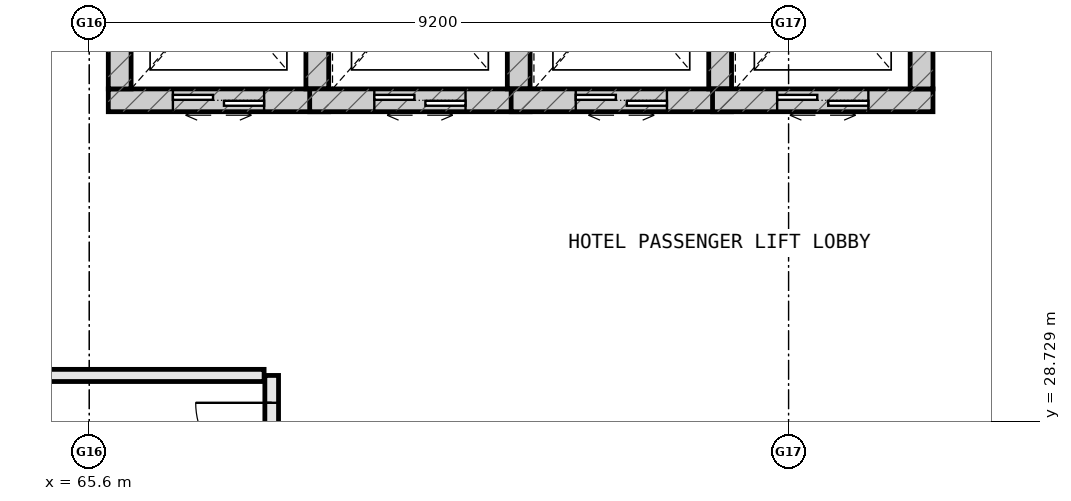
"""IFC4 building model, lengths in metres.
Left out: names, types, materials, properties, quantities, classifications, styles, units other than length and angle.
Written with IfcOpenShell. Run it as: python <this file> out.ifc"""

import sys

from ifc_helpers import new_model, si_unit, direction, frame, frame_2d, origin, place, context, subcontext, project, spatial, rectangle, extrude, element, fill, save


model = new_model("IFC4")
c1 = context("Model", 3, precision=1e-05, world=origin(), true_north=direction((0.0, 1.0)))
c2 = subcontext(c1, "Body", "Model", "MODEL_VIEW")
j1 = project(units=[si_unit("LENGTHUNIT", "METRE"), si_unit("PLANEANGLEUNIT", "RADIAN")], contexts=[c1])
p1 = place(None, origin())
s1 = spatial("IfcSite", under=j1, at=p1, CompositionType="ELEMENT")
p2 = place(p1, origin())
s2 = spatial("IfcBuilding", under=s1, at=p2, CompositionType="ELEMENT")
p3 = place(p2, frame((0.0, 0.0, 16.2)))
s3 = spatial("IfcBuildingStorey", under=s2, at=p3, CompositionType="ELEMENT", Elevation=16.2)
p4 = place(p3, frame((65.85, 32.95, 0.0), z_axis=(0.0, 0.0, 1.0), x_axis=(1.0, 0.0, 0.0)))
e1 = element("IfcWall", 1, at=p4, inside=s3, PredefinedType="SHEAR", context=c2, shape_type="SweptSolid", body=[
    extrude(rectangle(XDim=2.9, YDim=0.3, at=frame_2d((1.45, 0.0))), origin(), (0.0, 0.0, 1.0), 3.8),
])
p5 = place(p4, frame((0.85, 0.0, 0.0)))
e2 = element("IfcOpeningElement", 2, at=p5, cuts=e1, PredefinedType="OPENING", context=c2, shape_type="SweptSolid", body=[
    extrude(rectangle(XDim=1.2, YDim=2.2, at=frame_2d((0.6, 1.1))), frame((0.0, 0.162, 0.0), z_axis=(0.0, -1.0, 0.0), x_axis=(1.0, 0.0, 0.0)), (0.0, 0.0, 1.0), 0.324),
])
for number, where, z_axis, x_axis in (
    (3, (68.6, 33.1, 0.0), (0.0, 0.0, 1.0), (0.0, 1.0, 0.0)),
    (4, (66.0, 35.7, 0.0), (0.0, 0.0, 1.0), (0.0, -1.0, 0.0)),
):
    element("IfcWall", number, at=place(p3, frame(where, z_axis=z_axis, x_axis=x_axis)), inside=s3, PredefinedType="SHEAR", context=c2, shape_type="SweptSolid", body=[
        extrude(rectangle(XDim=2.6, YDim=0.3, at=frame_2d((1.3, 0.0))), origin(), (0.0, 0.0, 1.0), 3.8),
    ])
p6 = place(p3, frame((68.5, 32.95, 0.0), z_axis=(0.0, 0.0, 1.0), x_axis=(1.0, 0.0, 0.0)))
e5 = element("IfcWall", 5, at=p6, inside=s3, PredefinedType="SHEAR", context=c2, shape_type="SweptSolid", body=[
    extrude(rectangle(XDim=2.9, YDim=0.3, at=frame_2d((1.45, 0.0))), origin(), (0.0, 0.0, 1.0), 3.8),
])
p7 = place(p6, frame((0.85, 0.0, 0.0)))
e6 = element("IfcOpeningElement", 6, at=p7, cuts=e5, PredefinedType="OPENING", context=c2, shape_type="SweptSolid", body=[
    extrude(rectangle(XDim=1.2, YDim=2.2, at=frame_2d((0.6, 1.1))), frame((0.0, 0.162, 0.0), z_axis=(0.0, -1.0, 0.0), x_axis=(1.0, 0.0, 0.0)), (0.0, 0.0, 1.0), 0.324),
])
p8 = place(p3, frame((71.25, 33.1, 0.0), z_axis=(0.0, 0.0, 1.0), x_axis=(0.0, 1.0, 0.0)))
e7 = element("IfcWall", 7, at=p8, inside=s3, PredefinedType="SHEAR", context=c2, shape_type="SweptSolid", body=[
    extrude(rectangle(XDim=2.6, YDim=0.3, at=frame_2d((1.3, 0.0))), origin(), (0.0, 0.0, 1.0), 3.8),
])
p9 = place(p3, frame((71.15, 32.95, 0.0), z_axis=(0.0, 0.0, 1.0), x_axis=(1.0, 0.0, 0.0)))
e8 = element("IfcWall", 8, at=p9, inside=s3, PredefinedType="SHEAR", context=c2, shape_type="SweptSolid", body=[
    extrude(rectangle(XDim=2.9, YDim=0.3, at=frame_2d((1.45, 0.0))), origin(), (0.0, 0.0, 1.0), 3.8),
])
p10 = place(p9, frame((0.85, 0.0, 0.0)))
e9 = element("IfcOpeningElement", 9, at=p10, cuts=e8, PredefinedType="OPENING", context=c2, shape_type="SweptSolid", body=[
    extrude(rectangle(XDim=1.2, YDim=2.2, at=frame_2d((0.6, 1.1))), frame((0.0, 0.162, 0.0), z_axis=(0.0, -1.0, 0.0), x_axis=(1.0, 0.0, 0.0)), (0.0, 0.0, 1.0), 0.324),
])
p11 = place(p3, frame((73.9, 33.1, 0.0), z_axis=(0.0, 0.0, 1.0), x_axis=(0.0, 1.0, 0.0)))
e10 = element("IfcWall", 10, at=p11, inside=s3, PredefinedType="SHEAR", context=c2, shape_type="SweptSolid", body=[
    extrude(rectangle(XDim=2.6, YDim=0.3, at=frame_2d((1.3, 0.0))), origin(), (0.0, 0.0, 1.0), 3.8),
])
p12 = place(p3, frame((73.8, 32.95, 0.0), z_axis=(0.0, 0.0, 1.0), x_axis=(1.0, 0.0, 0.0)))
e11 = element("IfcWall", 11, at=p12, inside=s3, PredefinedType="SHEAR", context=c2, shape_type="SweptSolid", body=[
    extrude(rectangle(XDim=2.9, YDim=0.3, at=frame_2d((1.45, 0.0))), origin(), (0.0, 0.0, 1.0), 3.8),
])
p13 = place(p12, frame((0.85, 0.0, 0.0)))
e12 = element("IfcOpeningElement", 12, at=p13, cuts=e11, PredefinedType="OPENING", context=c2, shape_type="SweptSolid", body=[
    extrude(rectangle(XDim=1.2, YDim=2.2, at=frame_2d((0.6, 1.1))), frame((0.0, 0.162, 0.0), z_axis=(0.0, -1.0, 0.0), x_axis=(1.0, 0.0, 0.0)), (0.0, 0.0, 1.0), 0.324),
])
p14 = place(p3, frame((76.55, 33.1, 0.0), z_axis=(0.0, 0.0, 1.0), x_axis=(0.0, 1.0, 0.0)))
e13 = element("IfcWall", 13, at=p14, inside=s3, PredefinedType="SHEAR", context=c2, shape_type="SweptSolid", body=[
    extrude(rectangle(XDim=2.6, YDim=0.3, at=frame_2d((1.3, 0.0))), origin(), (0.0, 0.0, 1.0), 3.8),
])
p15 = place(p3, frame((68.0, 25.65, 0.0), z_axis=(0.0, 0.0, 1.0), x_axis=(0.0, 1.0, 0.0)))
e14 = element("IfcWall", 14, at=p15, inside=s3, PredefinedType="PARTITIONING", context=c2, shape_type="SweptSolid", body=[
    extrude(rectangle(XDim=3.68, YDim=0.18, at=frame_2d((1.84, 0.0))), origin(), (0.0, 0.0, 1.0), 3.56),
])
p16 = place(p15, frame((2.32, 0.0, 0.0)))
e15 = element("IfcOpeningElement", 15, at=p16, cuts=e14, PredefinedType="OPENING", context=c2, shape_type="SweptSolid", body=[
    extrude(rectangle(XDim=1.0, YDim=2.2, at=frame_2d((0.5, 1.1))), frame((0.0, 0.102, 0.0), z_axis=(0.0, -1.0, 0.0), x_axis=(1.0, 0.0, 0.0)), (0.0, 0.0, 1.0), 0.204),
])
p17 = place(p3, frame((60.96, 29.33, 0.0), z_axis=(0.0, 0.0, 1.0), x_axis=(1.0, 0.0, 0.0)))
e16 = element("IfcWall", 16, at=p17, inside=s3, PredefinedType="PARTITIONING", context=c2, shape_type="SweptSolid", body=[
    extrude(rectangle(XDim=6.94, YDim=0.16, at=frame_2d((3.47, 0.0))), origin(), (0.0, 0.0, 1.0), 3.56),
])
p18 = place(p5, origin())
e17 = element("IfcDoor", 17, at=p18, inside=s3, OperationType="DOUBLE_DOOR_SLIDING", PredefinedType="DOOR", context=c2, shape_type="SweptSolid", body=[
    extrude(rectangle(XDim=1.2, YDim=2.2, at=frame_2d((0.6, 1.1))), frame((0.0, 0.025, 0.0), z_axis=(0.0, -1.0, 0.0), x_axis=(1.0, 0.0, 0.0)), (0.0, 0.0, 1.0), 0.05),
])
fill(e2, e17)
p19 = place(p7, origin())
e18 = element("IfcDoor", 18, at=p19, inside=s3, OperationType="DOUBLE_DOOR_SLIDING", PredefinedType="DOOR", context=c2, shape_type="SweptSolid", body=[
    extrude(rectangle(XDim=1.2, YDim=2.2, at=frame_2d((0.6, 1.1))), frame((0.0, 0.025, 0.0), z_axis=(0.0, -1.0, 0.0), x_axis=(1.0, 0.0, 0.0)), (0.0, 0.0, 1.0), 0.05),
])
fill(e6, e18)
p20 = place(p10, origin())
e19 = element("IfcDoor", 19, at=p20, inside=s3, OperationType="DOUBLE_DOOR_SLIDING", PredefinedType="DOOR", context=c2, shape_type="SweptSolid", body=[
    extrude(rectangle(XDim=1.2, YDim=2.2, at=frame_2d((0.6, 1.1))), frame((0.0, 0.025, 0.0), z_axis=(0.0, -1.0, 0.0), x_axis=(1.0, 0.0, 0.0)), (0.0, 0.0, 1.0), 0.05),
])
fill(e9, e19)
p21 = place(p13, origin())
e20 = element("IfcDoor", 20, at=p21, inside=s3, OperationType="DOUBLE_DOOR_SLIDING", PredefinedType="DOOR", context=c2, shape_type="SweptSolid", body=[
    extrude(rectangle(XDim=1.2, YDim=2.2, at=frame_2d((0.6, 1.1))), frame((0.0, 0.025, 0.0), z_axis=(0.0, -1.0, 0.0), x_axis=(1.0, 0.0, 0.0)), (0.0, 0.0, 1.0), 0.05),
])
fill(e12, e20)
p22 = place(p16, origin())
e21 = element("IfcDoor", 21, at=p22, inside=s3, OperationType="SINGLE_SWING_RIGHT", PredefinedType="DOOR", context=c2, shape_type="SweptSolid", body=[
    extrude(rectangle(XDim=1.0, YDim=2.2, at=frame_2d((0.5, 1.1))), frame((0.0, 0.025, 0.0), z_axis=(0.0, -1.0, 0.0), x_axis=(1.0, 0.0, 0.0)), (0.0, 0.0, 1.0), 0.05),
])
fill(e15, e21)
save(model, sys.argv[1])
